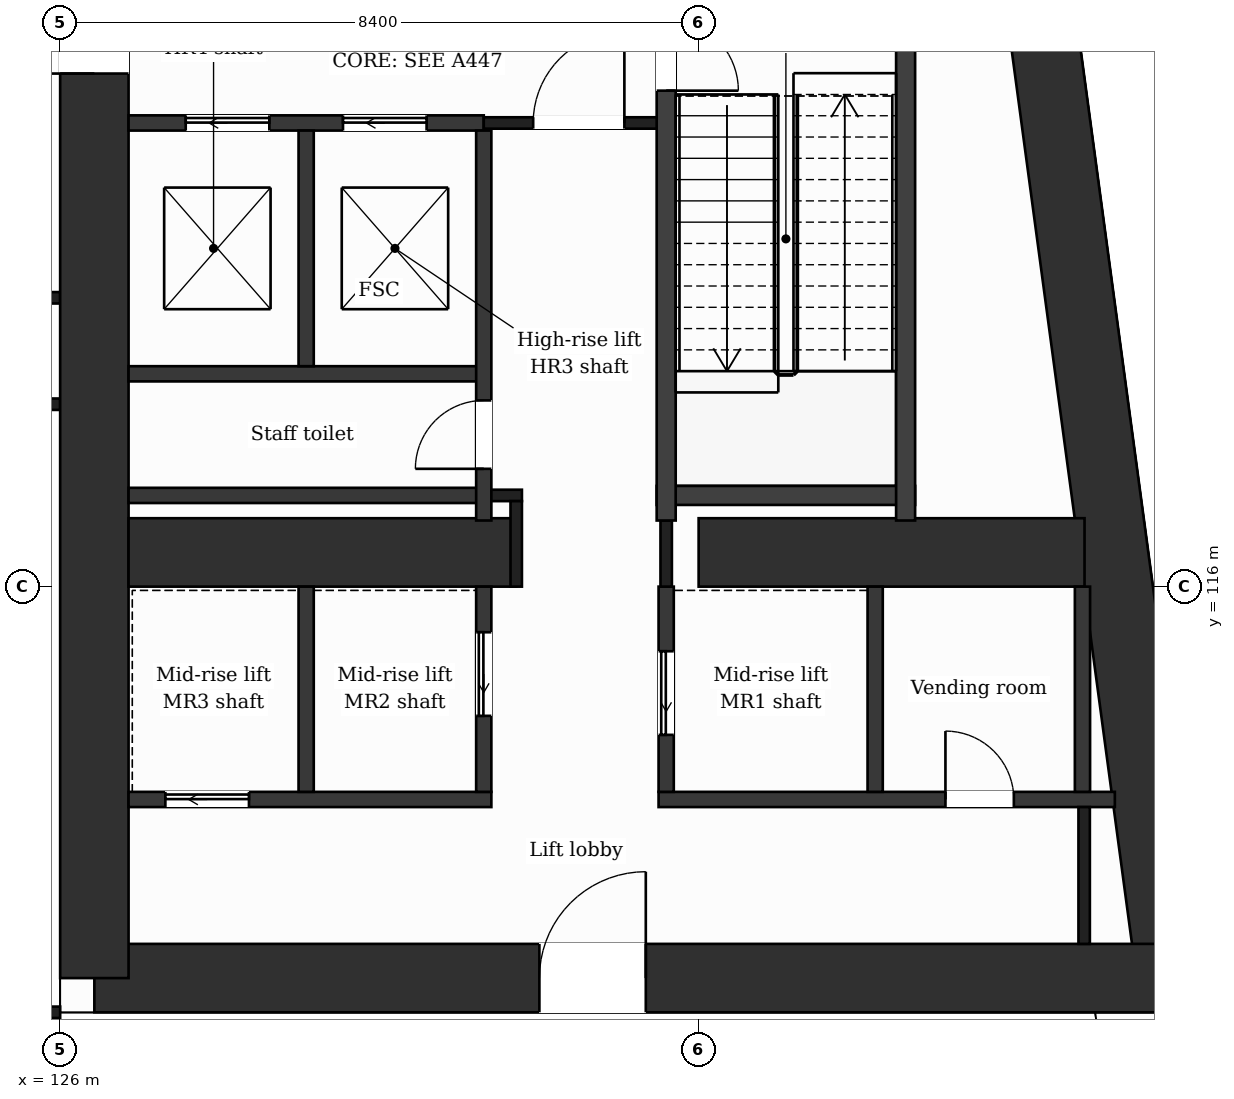
"""IFC4 building model, lengths in metres.
Left out: names, types, materials, properties, quantities, classifications, styles, units other than length and angle.
Written with IfcOpenShell. Run it as: python <this file> out.ifc"""

import sys

from ifc_helpers import new_model, si_unit, direction, frame, frame_2d, origin, place, context, subcontext, project, spatial, rectangle, extrude, element, fill, save


model = new_model("IFC4")
c1 = context("Model", 3, precision=1e-05, world=origin(), true_north=direction((0.0, 1.0)))
c2 = subcontext(c1, "Body", "Model", "MODEL_VIEW")
j1 = project(units=[si_unit("LENGTHUNIT", "METRE"), si_unit("PLANEANGLEUNIT", "RADIAN")], contexts=[c1])
p1 = place(None, origin())
s1 = spatial("IfcSite", under=j1, at=p1, CompositionType="ELEMENT")
p2 = place(p1, origin())
s2 = spatial("IfcBuilding", under=s1, at=p2, CompositionType="ELEMENT")
p3 = place(p2, frame((0.0, 0.0, 192.2)))
s3 = spatial("IfcBuildingStorey", under=s2, at=p3, CompositionType="ELEMENT", Elevation=192.2)
p4 = place(p3, frame((137.776, 131.95, 0.0), z_axis=(0.0, 0.0, 1.0), x_axis=(0.133421759112, -0.991059349482, 0.0)))
e1 = element("IfcWall", 1, at=p4, inside=s3, PredefinedType="SHEAR", context=c2, shape_type="SweptSolid", body=[
    extrude(rectangle(XDim=21.29, YDim=0.9, at=frame_2d((10.645, 0.0))), origin(), (0.0, 0.0, 1.0), 5.0),
])
p5 = place(p3, frame((140.616, 110.85, 0.0), z_axis=(0.0, 0.0, 1.0), x_axis=(-1.0, 0.0, 0.0)))
e2 = element("IfcWall", 2, at=p5, inside=s3, PredefinedType="SHEAR", context=c2, shape_type="SweptSolid", body=[
    extrude(rectangle(XDim=14.166, YDim=0.9, at=frame_2d((7.083, 0.0))), origin(), (0.0, 0.0, 1.0), 5.0),
])
p6 = place(p5, frame((6.911, 0.0, 0.0)))
e3 = element("IfcOpeningElement", 3, at=p6, cuts=e2, PredefinedType="OPENING", context=c2, shape_type="SweptSolid", body=[
    extrude(rectangle(XDim=1.4, YDim=2.1, at=frame_2d((0.7, 1.05))), frame((0.0, 0.46, 0.0), z_axis=(0.0, -1.0, 0.0), x_axis=(1.0, 0.0, 0.0)), (0.0, 0.0, 1.0), 0.92),
])
p7 = place(p3, frame((126.45, 110.85, 0.0), z_axis=(0.0, 0.0, 1.0), x_axis=(0.0, 1.0, 0.0)))
e4 = element("IfcWall", 4, at=p7, inside=s3, PredefinedType="SHEAR", context=c2, shape_type="SweptSolid", body=[
    extrude(rectangle(XDim=21.1, YDim=0.9, at=frame_2d((10.55, 0.0))), origin(), (0.0, 0.0, 1.0), 5.0),
])
p8 = place(p7, frame((11.9, 0.0, 0.0)))
e5 = element("IfcOpeningElement", 5, at=p8, cuts=e4, PredefinedType="OPENING", context=c2, shape_type="SweptSolid", body=[
    extrude(rectangle(XDim=1.4, YDim=2.1, at=frame_2d((0.7, 1.05))), frame((0.0, 0.46, 0.0), z_axis=(0.0, -1.0, 0.0), x_axis=(1.0, 0.0, 0.0)), (0.0, 0.0, 1.0), 0.92),
])
p9 = place(p3, frame((126.9, 116.45, 0.0), z_axis=(0.0, 0.0, 1.0), x_axis=(1.0, 0.0, 0.0)))
e6 = element("IfcWall", 6, at=p9, inside=s3, PredefinedType="SHEAR", context=c2, shape_type="SweptSolid", body=[
    extrude(rectangle(XDim=5.1, YDim=0.9, at=frame_2d((2.55, 0.0))), origin(), (0.0, 0.0, 1.0), 5.0),
])
p10 = place(p3, frame((134.4, 116.45, 0.0), z_axis=(0.0, 0.0, 1.0), x_axis=(1.0, 0.0, 0.0)))
e7 = element("IfcWall", 7, at=p10, inside=s3, PredefinedType="SHEAR", context=c2, shape_type="SweptSolid", body=[
    extrude(rectangle(XDim=5.077, YDim=0.9, at=frame_2d((2.539, 0.0))), origin(), (0.0, 0.0, 1.0), 5.0),
])
p11 = place(p3, frame((108.0, 110.4, 0.0), z_axis=(0.0, 0.0, 1.0), x_axis=(1.0, 0.0, 0.0)))
e8 = element("IfcWall", 8, at=p11, inside=s3, PredefinedType="PARTITIONING", context=c2, shape_type="SweptSolid", body=[
    extrude(rectangle(XDim=18.0, YDim=0.15, at=frame_2d((9.0, 0.0))), origin(), (0.0, 0.0, 1.0), 4.5),
])
p12 = place(p3, frame((126.9, 113.2, 0.0), z_axis=(0.0, 0.0, 1.0), x_axis=(1.0, 0.0, 0.0)))
e9 = element("IfcWall", 9, at=p12, inside=s3, PredefinedType="PARTITIONING", context=c2, shape_type="SweptSolid", body=[
    extrude(rectangle(XDim=4.773, YDim=0.2, at=frame_2d((2.387, 0.0))), origin(), (0.0, 0.0, 1.0), 4.5),
])
p13 = place(p12, frame((0.484, 0.0, 0.0)))
e10 = element("IfcOpeningElement", 10, at=p13, cuts=e9, PredefinedType="OPENING", context=c2, shape_type="SweptSolid", body=[
    extrude(rectangle(XDim=1.1, YDim=2.1, at=frame_2d((0.55, 1.05))), frame((0.0, 0.11, 0.0), z_axis=(0.0, -1.0, 0.0), x_axis=(1.0, 0.0, 0.0)), (0.0, 0.0, 1.0), 0.22),
])
p14 = place(p3, frame((133.873, 113.2, 0.0), z_axis=(0.0, 0.0, 1.0), x_axis=(1.0, 0.0, 0.0)))
e11 = element("IfcWall", 11, at=p14, inside=s3, PredefinedType="PARTITIONING", context=c2, shape_type="SweptSolid", body=[
    extrude(rectangle(XDim=6.003, YDim=0.2, at=frame_2d((3.001, 0.0))), origin(), (0.0, 0.0, 1.0), 4.5),
])
p15 = place(p14, frame((3.774, 0.0, 0.0)))
e12 = element("IfcOpeningElement", 12, at=p15, cuts=e11, PredefinedType="OPENING", context=c2, shape_type="SweptSolid", body=[
    extrude(rectangle(XDim=0.9, YDim=2.1, at=frame_2d((0.45, 1.05))), frame((0.0, 0.11, 0.0), z_axis=(0.0, -1.0, 0.0), x_axis=(1.0, 0.0, 0.0)), (0.0, 0.0, 1.0), 0.22),
])
p16 = place(p3, frame((126.9, 117.2, 0.0), z_axis=(0.0, 0.0, 1.0), x_axis=(1.0, 0.0, 0.0)))
e13 = element("IfcWall", 13, at=p16, inside=s3, PredefinedType="PARTITIONING", context=c2, shape_type="SweptSolid", body=[
    extrude(rectangle(XDim=4.673, YDim=0.2, at=frame_2d((2.336, 0.0))), origin(), (0.0, 0.0, 1.0), 4.5),
])
p17 = place(p3, frame((131.573, 117.2, 0.0), z_axis=(0.0, 0.0, 1.0), x_axis=(1.0, 0.0, 0.0)))
e14 = element("IfcWall", 14, at=p17, inside=s3, PredefinedType="PARTITIONING", context=c2, shape_type="SweptSolid", body=[
    extrude(rectangle(XDim=0.502, YDim=0.15, at=frame_2d((0.251, 0.0))), origin(), (0.0, 0.0, 1.0), 4.5),
])
p18 = place(p3, frame((133.848, 117.2, 0.0), z_axis=(0.0, 0.0, 1.0), x_axis=(1.0, 0.0, 0.0)))
e15 = element("IfcWall", 15, at=p18, inside=s3, PredefinedType="PARTITIONING", context=c2, shape_type="SweptSolid", body=[
    extrude(rectangle(XDim=3.4, YDim=0.25, at=frame_2d((1.7, 0.0))), origin(), (0.0, 0.0, 1.0), 4.5),
])
p19 = place(p3, frame((107.925, 118.4, 0.0), z_axis=(0.0, 0.0, 1.0), x_axis=(1.0, 0.0, 0.0)))
e16 = element("IfcWall", 16, at=p19, inside=s3, PredefinedType="PARTITIONING", context=c2, shape_type="SweptSolid", body=[
    extrude(rectangle(XDim=18.075, YDim=0.15, at=frame_2d((9.038, 0.0))), origin(), (0.0, 0.0, 1.0), 4.5),
])
p20 = place(p19, frame((8.475, 0.0, 0.0)))
e17 = element("IfcOpeningElement", 17, at=p20, cuts=e16, PredefinedType="OPENING", context=c2, shape_type="SweptSolid", body=[
    extrude(rectangle(XDim=1.2, YDim=2.1, at=frame_2d((0.6, 1.05))), frame((0.0, 0.085, 0.0), z_axis=(0.0, -1.0, 0.0), x_axis=(1.0, 0.0, 0.0)), (0.0, 0.0, 1.0), 0.17),
])
p21 = place(p3, frame((126.9, 118.8, 0.0), z_axis=(0.0, 0.0, 1.0), x_axis=(1.0, 0.0, 0.0)))
e18 = element("IfcWall", 18, at=p21, inside=s3, PredefinedType="PARTITIONING", context=c2, shape_type="SweptSolid", body=[
    extrude(rectangle(XDim=4.673, YDim=0.2, at=frame_2d((2.336, 0.0))), origin(), (0.0, 0.0, 1.0), 4.5),
])
p22 = place(p3, frame((120.125, 119.8, 0.0), z_axis=(0.0, 0.0, 1.0), x_axis=(1.0, 0.0, 0.0)))
e19 = element("IfcWall", 19, at=p22, inside=s3, PredefinedType="PARTITIONING", context=c2, shape_type="SweptSolid", body=[
    extrude(rectangle(XDim=5.875, YDim=0.15, at=frame_2d((2.938, 0.0))), origin(), (0.0, 0.0, 1.0), 4.5),
])
p23 = place(p3, frame((126.9, 122.1, 0.0), z_axis=(0.0, 0.0, 1.0), x_axis=(1.0, 0.0, 0.0)))
e20 = element("IfcWall", 20, at=p23, inside=s3, PredefinedType="PARTITIONING", context=c2, shape_type="SweptSolid", body=[
    extrude(rectangle(XDim=4.673, YDim=0.2, at=frame_2d((2.336, 0.0))), origin(), (0.0, 0.0, 1.0), 4.5),
])
p24 = place(p23, frame((2.821, 0.0, 0.0)))
e21 = element("IfcOpeningElement", 21, at=p24, cuts=e20, PredefinedType="OPENING", context=c2, shape_type="SweptSolid", body=[
    extrude(rectangle(XDim=1.1, YDim=2.1, at=frame_2d((0.55, 1.05))), frame((0.0, 0.11, 0.0), z_axis=(0.0, -1.0, 0.0), x_axis=(1.0, 0.0, 0.0)), (0.0, 0.0, 1.0), 0.22),
])
p25 = place(p23, frame((0.752, 0.0, 0.0)))
e22 = element("IfcOpeningElement", 22, at=p25, cuts=e20, PredefinedType="OPENING", context=c2, shape_type="SweptSolid", body=[
    extrude(rectangle(XDim=1.1, YDim=2.1, at=frame_2d((0.55, 1.05))), frame((0.0, 0.11, 0.0), z_axis=(0.0, -1.0, 0.0), x_axis=(1.0, 0.0, 0.0)), (0.0, 0.0, 1.0), 0.22),
])
p26 = place(p3, frame((131.573, 122.1, 0.0), z_axis=(0.0, 0.0, 1.0), x_axis=(1.0, 0.0, 0.0)))
e23 = element("IfcWall", 23, at=p26, inside=s3, PredefinedType="PARTITIONING", context=c2, shape_type="SweptSolid", body=[
    extrude(rectangle(XDim=2.4, YDim=0.15, at=frame_2d((1.2, 0.0))), origin(), (0.0, 0.0, 1.0), 4.5),
])
p27 = place(p26, frame((0.65, 0.0, 0.0)))
e24 = element("IfcOpeningElement", 24, at=p27, cuts=e23, PredefinedType="OPENING", context=c2, shape_type="SweptSolid", body=[
    extrude(rectangle(XDim=1.2, YDim=2.1, at=frame_2d((0.6, 1.05))), frame((0.0, 0.085, 0.0), z_axis=(0.0, -1.0, 0.0), x_axis=(1.0, 0.0, 0.0)), (0.0, 0.0, 1.0), 0.17),
])
p28 = place(p3, frame((129.237, 113.3, 0.0), z_axis=(0.0, 0.0, 1.0), x_axis=(0.0, 1.0, 0.0)))
e25 = element("IfcWall", 25, at=p28, inside=s3, PredefinedType="PARTITIONING", context=c2, shape_type="SweptSolid", body=[
    extrude(rectangle(XDim=2.7, YDim=0.2, at=frame_2d((1.35, 0.0))), origin(), (0.0, 0.0, 1.0), 4.5),
])
p29 = place(p3, frame((129.237, 118.9, 0.0), z_axis=(0.0, 0.0, 1.0), x_axis=(0.0, 1.0, 0.0)))
e26 = element("IfcWall", 26, at=p29, inside=s3, PredefinedType="PARTITIONING", context=c2, shape_type="SweptSolid", body=[
    extrude(rectangle(XDim=3.1, YDim=0.2, at=frame_2d((1.55, 0.0))), origin(), (0.0, 0.0, 1.0), 4.5),
])
p30 = place(p3, frame((131.573, 113.3, 0.0), z_axis=(0.0, 0.0, 1.0), x_axis=(0.0, 1.0, 0.0)))
e27 = element("IfcWall", 27, at=p30, inside=s3, PredefinedType="PARTITIONING", context=c2, shape_type="SweptSolid", body=[
    extrude(rectangle(XDim=2.7, YDim=0.2, at=frame_2d((1.35, 0.0))), origin(), (0.0, 0.0, 1.0), 4.5),
])
p31 = place(p30, frame((1.0, 0.0, 0.0)))
e28 = element("IfcOpeningElement", 28, at=p31, cuts=e27, PredefinedType="OPENING", context=c2, shape_type="SweptSolid", body=[
    extrude(rectangle(XDim=1.1, YDim=2.1, at=frame_2d((0.55, 1.05))), frame((0.0, 0.11, 0.0), z_axis=(0.0, -1.0, 0.0), x_axis=(1.0, 0.0, 0.0)), (0.0, 0.0, 1.0), 0.22),
])
p32 = place(p3, frame((131.573, 116.87, 0.0), z_axis=(0.0, 0.0, 1.0), x_axis=(0.0, 1.0, 0.0)))
e29 = element("IfcWall", 29, at=p32, inside=s3, PredefinedType="PARTITIONING", context=c2, shape_type="SweptSolid", body=[
    extrude(rectangle(XDim=5.13, YDim=0.2, at=frame_2d((2.565, 0.0))), origin(), (0.0, 0.0, 1.0), 4.5),
])
p33 = place(p32, frame((0.68, 0.0, 0.0)))
e30 = element("IfcOpeningElement", 30, at=p33, cuts=e29, PredefinedType="OPENING", context=c2, shape_type="SweptSolid", body=[
    extrude(rectangle(XDim=0.9, YDim=2.1, at=frame_2d((0.45, 1.05))), frame((0.0, 0.11, 0.0), z_axis=(0.0, -1.0, 0.0), x_axis=(1.0, 0.0, 0.0)), (0.0, 0.0, 1.0), 0.22),
])
p34 = place(p3, frame((132.0, 116.0, 0.0), z_axis=(0.0, 0.0, 1.0), x_axis=(0.0, 1.0, 0.0)))
e31 = element("IfcWall", 31, at=p34, inside=s3, PredefinedType="PARTITIONING", context=c2, shape_type="SweptSolid", body=[
    extrude(rectangle(XDim=1.125, YDim=0.15, at=frame_2d((0.562, 0.0))), origin(), (0.0, 0.0, 1.0), 4.5),
])
p35 = place(p3, frame((133.973, 113.3, 0.0), z_axis=(0.0, 0.0, 1.0), x_axis=(0.0, 1.0, 0.0)))
e32 = element("IfcWall", 32, at=p35, inside=s3, PredefinedType="PARTITIONING", context=c2, shape_type="SweptSolid", body=[
    extrude(rectangle(XDim=2.7, YDim=0.2, at=frame_2d((1.35, 0.0))), origin(), (0.0, 0.0, 1.0), 4.5),
])
p36 = place(p35, frame((0.75, 0.0, 0.0)))
e33 = element("IfcOpeningElement", 33, at=p36, cuts=e32, PredefinedType="OPENING", context=c2, shape_type="SweptSolid", body=[
    extrude(rectangle(XDim=1.1, YDim=2.1, at=frame_2d((0.55, 1.05))), frame((0.0, 0.11, 0.0), z_axis=(0.0, -1.0, 0.0), x_axis=(1.0, 0.0, 0.0)), (0.0, 0.0, 1.0), 0.22),
])
p37 = place(p3, frame((133.973, 116.0, 0.0), z_axis=(0.0, 0.0, 1.0), x_axis=(0.0, 1.0, 0.0)))
e34 = element("IfcWall", 34, at=p37, inside=s3, PredefinedType="PARTITIONING", context=c2, shape_type="SweptSolid", body=[
    extrude(rectangle(XDim=0.87, YDim=0.15, at=frame_2d((0.435, 0.0))), origin(), (0.0, 0.0, 1.0), 4.5),
])
p38 = place(p3, frame((133.973, 116.87, 0.0), z_axis=(0.0, 0.0, 1.0), x_axis=(0.0, 1.0, 0.0)))
e35 = element("IfcWall", 35, at=p38, inside=s3, PredefinedType="PARTITIONING", context=c2, shape_type="SweptSolid", body=[
    extrude(rectangle(XDim=6.955, YDim=0.25, at=frame_2d((3.478, 0.0))), origin(), (0.0, 0.0, 1.0), 4.5),
])
p39 = place(p38, frame((5.655, 0.0, 0.0)))
e36 = element("IfcOpeningElement", 36, at=p39, cuts=e35, PredefinedType="OPENING", context=c2, shape_type="SweptSolid", body=[
    extrude(rectangle(XDim=0.95, YDim=2.1, at=frame_2d((0.475, 1.05))), frame((0.0, 0.135, 0.0), z_axis=(0.0, -1.0, 0.0), x_axis=(1.0, 0.0, 0.0)), (0.0, 0.0, 1.0), 0.27),
])
p40 = place(p3, frame((136.722, 113.3, 0.0), z_axis=(0.0, 0.0, 1.0), x_axis=(0.0, 1.0, 0.0)))
e37 = element("IfcWall", 37, at=p40, inside=s3, PredefinedType="PARTITIONING", context=c2, shape_type="SweptSolid", body=[
    extrude(rectangle(XDim=2.7, YDim=0.2, at=frame_2d((1.35, 0.0))), origin(), (0.0, 0.0, 1.0), 4.5),
])
p41 = place(p3, frame((137.123, 116.87, 0.0), z_axis=(0.0, 0.0, 1.0), x_axis=(0.0, 1.0, 0.0)))
e38 = element("IfcWall", 38, at=p41, inside=s3, PredefinedType="PARTITIONING", context=c2, shape_type="SweptSolid", body=[
    extrude(rectangle(XDim=6.955, YDim=0.25, at=frame_2d((3.478, 0.0))), origin(), (0.0, 0.0, 1.0), 4.5),
])
p42 = place(p3, frame((139.45, 113.3, 0.0), z_axis=(0.0, 0.0, 1.0), x_axis=(0.0, 1.0, 0.0)))
e39 = element("IfcWall", 39, at=p42, inside=s3, PredefinedType="PARTITIONING", context=c2, shape_type="SweptSolid", body=[
    extrude(rectangle(XDim=2.7, YDim=0.2, at=frame_2d((1.35, 0.0))), origin(), (0.0, 0.0, 1.0), 4.5),
])
p43 = place(p3, frame((139.472, 111.3, 0.0), z_axis=(0.0, 0.0, 1.0), x_axis=(0.0, 1.0, 0.0)))
e40 = element("IfcWall", 40, at=p43, inside=s3, PredefinedType="PARTITIONING", context=c2, shape_type="SweptSolid", body=[
    extrude(rectangle(XDim=1.8, YDim=0.15, at=frame_2d((0.9, 0.0))), origin(), (0.0, 0.0, 1.0), 4.5),
])
p44 = place(p27, origin())
e41 = element("IfcDoor", 41, at=p44, inside=s3, OperationType="SINGLE_SWING_RIGHT", PredefinedType="DOOR", context=c2, shape_type="SweptSolid", body=[
    extrude(rectangle(XDim=1.2, YDim=2.1, at=frame_2d((0.6, 1.05))), frame((0.0, 0.025, 0.0), z_axis=(0.0, -1.0, 0.0), x_axis=(1.0, 0.0, 0.0)), (0.0, 0.0, 1.0), 0.05),
])
fill(e24, e41)
p45 = place(p24, origin())
e42 = element("IfcDoor", 42, at=p45, inside=s3, OperationType="SLIDING_TO_LEFT", PredefinedType="DOOR", context=c2, shape_type="SweptSolid", body=[
    extrude(rectangle(XDim=1.1, YDim=2.1, at=frame_2d((0.55, 1.05))), frame((0.0, 0.025, 0.0), z_axis=(0.0, -1.0, 0.0), x_axis=(1.0, 0.0, 0.0)), (0.0, 0.0, 1.0), 0.05),
])
fill(e21, e42)
p46 = place(p25, origin())
e43 = element("IfcDoor", 43, at=p46, inside=s3, OperationType="SLIDING_TO_LEFT", PredefinedType="DOOR", context=c2, shape_type="SweptSolid", body=[
    extrude(rectangle(XDim=1.1, YDim=2.1, at=frame_2d((0.55, 1.05))), frame((0.0, 0.025, 0.0), z_axis=(0.0, -1.0, 0.0), x_axis=(1.0, 0.0, 0.0)), (0.0, 0.0, 1.0), 0.05),
])
fill(e22, e43)
p47 = place(p39, origin())
e44 = element("IfcDoor", 44, at=p47, inside=s3, OperationType="SINGLE_SWING_LEFT", PredefinedType="DOOR", context=c2, shape_type="SweptSolid", body=[
    extrude(rectangle(XDim=0.95, YDim=2.1, at=frame_2d((0.475, 1.05))), frame((0.0, 0.025, 0.0), z_axis=(0.0, -1.0, 0.0), x_axis=(1.0, 0.0, 0.0)), (0.0, 0.0, 1.0), 0.05),
])
fill(e36, e44)
p48 = place(p33, origin())
e45 = element("IfcDoor", 45, at=p48, inside=s3, OperationType="SINGLE_SWING_LEFT", PredefinedType="DOOR", context=c2, shape_type="SweptSolid", body=[
    extrude(rectangle(XDim=0.9, YDim=2.1, at=frame_2d((0.45, 1.05))), frame((0.0, 0.025, 0.0), z_axis=(0.0, -1.0, 0.0), x_axis=(1.0, 0.0, 0.0)), (0.0, 0.0, 1.0), 0.05),
])
fill(e30, e45)
p49 = place(p36, origin())
e46 = element("IfcDoor", 46, at=p49, inside=s3, OperationType="SLIDING_TO_LEFT", PredefinedType="DOOR", context=c2, shape_type="SweptSolid", body=[
    extrude(rectangle(XDim=1.1, YDim=2.1, at=frame_2d((0.55, 1.05))), frame((0.0, 0.025, 0.0), z_axis=(0.0, -1.0, 0.0), x_axis=(1.0, 0.0, 0.0)), (0.0, 0.0, 1.0), 0.05),
])
fill(e33, e46)
p50 = place(p31, origin())
e47 = element("IfcDoor", 47, at=p50, inside=s3, OperationType="SLIDING_TO_LEFT", PredefinedType="DOOR", context=c2, shape_type="SweptSolid", body=[
    extrude(rectangle(XDim=1.1, YDim=2.1, at=frame_2d((0.55, 1.05))), frame((0.0, 0.025, 0.0), z_axis=(0.0, -1.0, 0.0), x_axis=(1.0, 0.0, 0.0)), (0.0, 0.0, 1.0), 0.05),
])
fill(e28, e47)
p51 = place(p13, origin())
e48 = element("IfcDoor", 48, at=p51, inside=s3, OperationType="SLIDING_TO_LEFT", PredefinedType="DOOR", context=c2, shape_type="SweptSolid", body=[
    extrude(rectangle(XDim=1.1, YDim=2.1, at=frame_2d((0.55, 1.05))), frame((0.0, 0.025, 0.0), z_axis=(0.0, -1.0, 0.0), x_axis=(1.0, 0.0, 0.0)), (0.0, 0.0, 1.0), 0.05),
])
fill(e10, e48)
p52 = place(p15, origin())
e49 = element("IfcDoor", 49, at=p52, inside=s3, OperationType="SINGLE_SWING_LEFT", PredefinedType="DOOR", context=c2, shape_type="SweptSolid", body=[
    extrude(rectangle(XDim=0.9, YDim=2.1, at=frame_2d((0.45, 1.05))), frame((0.0, 0.025, 0.0), z_axis=(0.0, -1.0, 0.0), x_axis=(1.0, 0.0, 0.0)), (0.0, 0.0, 1.0), 0.05),
])
fill(e12, e49)
p53 = place(p6, origin())
e50 = element("IfcDoor", 50, at=p53, inside=s3, OperationType="SINGLE_SWING_LEFT", PredefinedType="DOOR", context=c2, shape_type="SweptSolid", body=[
    extrude(rectangle(XDim=1.4, YDim=2.1, at=frame_2d((0.7, 1.05))), frame((0.0, 0.025, 0.0), z_axis=(0.0, -1.0, 0.0), x_axis=(1.0, 0.0, 0.0)), (0.0, 0.0, 1.0), 0.05),
])
fill(e3, e50)
p54 = place(p8, origin())
e51 = element("IfcDoor", 51, at=p54, inside=s3, OperationType="SINGLE_SWING_LEFT", PredefinedType="DOOR", context=c2, shape_type="SweptSolid", body=[
    extrude(rectangle(XDim=1.4, YDim=2.1, at=frame_2d((0.7, 1.05))), frame((0.0, 0.025, 0.0), z_axis=(0.0, -1.0, 0.0), x_axis=(1.0, 0.0, 0.0)), (0.0, 0.0, 1.0), 0.05),
])
fill(e5, e51)
save(model, sys.argv[1])
